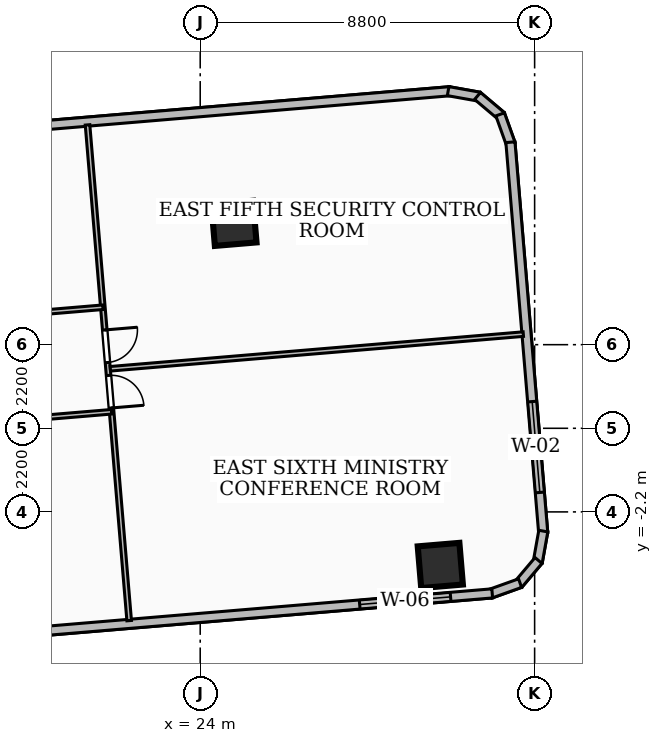
"""IFC4 building model, lengths in metres.
Left out: names, types, materials, properties, quantities, classifications, styles, units other than length and angle.
Written with IfcOpenShell. Run it as: python <this file> out.ifc"""

import sys

from ifc_helpers import new_model, si_unit, direction, frame, frame_2d, origin, origin_2d, place, context, subcontext, project, spatial, rectangle, extrude, element, fill, save


model = new_model("IFC4")
c1 = context("Model", 3, precision=1e-05, world=origin(), true_north=direction((0.0, 1.0)))
c2 = subcontext(c1, "Body", "Model", "MODEL_VIEW")
j1 = project(units=[si_unit("LENGTHUNIT", "METRE"), si_unit("PLANEANGLEUNIT", "RADIAN")], contexts=[c1])
p1 = place(None, origin())
s1 = spatial("IfcSite", under=j1, at=p1, CompositionType="ELEMENT")
p2 = place(p1, origin())
s2 = spatial("IfcBuilding", under=s1, at=p2, CompositionType="ELEMENT")
p3 = place(p2, frame((0.0, 0.0, 64.08)))
s3 = spatial("IfcBuildingStorey", under=s2, at=p3, CompositionType="ELEMENT", Elevation=64.08)
for number, where, z_axis, x_axis in (
    (1, (30.318, -3.609, 0.0), (0.0, 0.0, 1.0), (0.996, 0.084, 0.0)),
    (2, (24.888, 5.393, 0.0), (0.0, 0.0, 1.0), (0.996, 0.084, 0.0)),
):
    element("IfcColumn", number, at=place(p3, frame(where, z_axis=z_axis, x_axis=x_axis)), inside=s3, PredefinedType="COLUMN", context=c2, shape_type="SweptSolid", body=[
        extrude(rectangle(XDim=1.1, YDim=1.1, at=origin_2d()), origin(), (0.0, 0.0, 1.0), 3.6),
    ])
p4 = place(p3, frame((13.758, 7.458, 0.0), z_axis=(0.0, 0.0, 1.0), x_axis=(0.996498704409, 0.083608205999, 0.0)))
e3 = element("IfcWall", 3, at=p4, inside=s3, PredefinedType="SOLIDWALL", context=c2, shape_type="SweptSolid", body=[
    extrude(rectangle(XDim=16.875, YDim=0.24, at=frame_2d((8.438, 0.0))), origin(), (0.0, 0.0, 1.0), 2.072),
])
p5 = place(p3, frame((30.524, 8.871, 0.0), z_axis=(0.0, 0.0, 1.0), x_axis=(0.98444754165, -0.175678791378, 0.0)))
e4 = element("IfcWall", 4, at=p5, inside=s3, PredefinedType="SOLIDWALL", context=c2, shape_type="SweptSolid", body=[
    extrude(rectangle(XDim=0.831, YDim=0.24, at=frame_2d((0.416, 0.0))), origin(), (0.0, 0.0, 1.0), 3.34),
])
p6 = place(p3, frame((31.298, 8.745, 0.0), z_axis=(0.0, 0.0, 1.0), x_axis=(0.764000342655, -0.645215837083, 0.0)))
e5 = element("IfcWall", 5, at=p6, inside=s3, PredefinedType="SOLIDWALL", context=c2, shape_type="SweptSolid", body=[
    extrude(rectangle(XDim=0.814, YDim=0.24, at=frame_2d((0.407, 0.0))), origin(), (0.0, 0.0, 1.0), 3.34),
])
p7 = place(p3, frame((31.893, 8.26, 0.0), z_axis=(0.0, 0.0, 1.0), x_axis=(0.337136933599, -0.941455621898, 0.0)))
e6 = element("IfcWall", 6, at=p7, inside=s3, PredefinedType="SOLIDWALL", context=c2, shape_type="SweptSolid", body=[
    extrude(rectangle(XDim=0.831, YDim=0.24, at=frame_2d((0.415, 0.0))), origin(), (0.0, 0.0, 1.0), 3.34),
])
p8 = place(p3, frame((32.163, 7.527, 0.0), z_axis=(0.0, 0.0, 1.0), x_axis=(0.083619213047, -0.996497780835, 0.0)))
e7 = element("IfcWall", 7, at=p8, inside=s3, PredefinedType="SOLIDWALL", context=c2, shape_type="SweptSolid", body=[
    extrude(rectangle(XDim=10.318, YDim=0.24, at=frame_2d((5.159, 0.0))), origin(), (0.0, 0.0, 1.0), 3.34),
])
p9 = place(p8, frame((6.848, 0.0, 0.85)))
e8 = element("IfcOpeningElement", 8, at=p9, cuts=e7, PredefinedType="OPENING", context=c2, shape_type="SweptSolid", body=[
    extrude(rectangle(XDim=2.4, YDim=2.1, at=frame_2d((1.2, 1.05))), frame((0.0, 0.13, 0.0), z_axis=(0.0, -1.0, 0.0), x_axis=(1.0, 0.0, 0.0)), (0.0, 0.0, 1.0), 0.26),
])
p10 = place(p3, frame((33.028, -2.705, 0.0), z_axis=(0.0, 0.0, 1.0), x_axis=(-0.175729613604, -0.984438470857, 0.0)))
e9 = element("IfcWall", 9, at=p10, inside=s3, PredefinedType="SOLIDWALL", context=c2, shape_type="SweptSolid", body=[
    extrude(rectangle(XDim=0.831, YDim=0.24, at=frame_2d((0.416, 0.0))), origin(), (0.0, 0.0, 1.0), 3.34),
])
p11 = place(p3, frame((32.902, -3.479, 0.0), z_axis=(0.0, 0.0, 1.0), x_axis=(-0.645067994637, -0.764125174494, 0.0)))
e10 = element("IfcWall", 10, at=p11, inside=s3, PredefinedType="SOLIDWALL", context=c2, shape_type="SweptSolid", body=[
    extrude(rectangle(XDim=0.814, YDim=0.24, at=frame_2d((0.407, 0.0))), origin(), (0.0, 0.0, 1.0), 3.34),
])
p12 = place(p3, frame((32.417, -4.074, 0.0), z_axis=(0.0, 0.0, 1.0), x_axis=(-0.941455621898, -0.337136933599, 0.0)))
e11 = element("IfcWall", 11, at=p12, inside=s3, PredefinedType="SOLIDWALL", context=c2, shape_type="SweptSolid", body=[
    extrude(rectangle(XDim=0.831, YDim=0.24, at=frame_2d((0.415, 0.0))), origin(), (0.0, 0.0, 1.0), 3.34),
])
p13 = place(p3, frame((31.684, -4.344, 0.0), z_axis=(0.0, 0.0, 1.0), x_axis=(-0.996492776291, -0.083678831256, 0.0)))
e12 = element("IfcWall", 12, at=p13, inside=s3, PredefinedType="SOLIDWALL", context=c2, shape_type="SweptSolid", body=[
    extrude(rectangle(XDim=16.875, YDim=0.24, at=frame_2d((8.438, 0.0))), origin(), (0.0, 0.0, 1.0), 3.34),
])
p14 = place(p13, frame((1.1, 0.0, 0.85)))
e13 = element("IfcOpeningElement", 13, at=p14, cuts=e12, PredefinedType="OPENING", context=c2, shape_type="SweptSolid", body=[
    extrude(rectangle(XDim=2.4, YDim=1.85, at=frame_2d((1.2, 0.925))), frame((0.0, 0.13, 0.0), z_axis=(0.0, -1.0, 0.0), x_axis=(1.0, 0.0, 0.0)), (0.0, 0.0, 1.0), 0.26),
])
p15 = place(p3, frame((21.439, 3.185, 0.0), z_axis=(0.0, 0.0, 1.0), x_axis=(-0.996495574947, -0.083645496662, 0.0)))
e14 = element("IfcWall", 14, at=p15, inside=s3, PredefinedType="PARTITIONING", context=c2, shape_type="SweptSolid", body=[
    extrude(rectangle(XDim=7.341, YDim=0.12, at=frame_2d((3.67, 0.0))), origin(), (0.0, 0.0, 1.0), 2.152),
])
p16 = place(p15, frame((5.626, 0.0, 0.0)))
e15 = element("IfcOpeningElement", 15, at=p16, cuts=e14, PredefinedType="OPENING", context=c2, shape_type="SweptSolid", body=[
    extrude(rectangle(XDim=0.86, YDim=2.04, at=frame_2d((0.43, 1.02))), frame((0.0, 0.07, 0.0), z_axis=(0.0, -1.0, 0.0), x_axis=(1.0, 0.0, 0.0)), (0.0, 0.0, 1.0), 0.14),
])
p17 = place(p15, frame((1.956, 0.0, 0.0)))
e16 = element("IfcOpeningElement", 16, at=p17, cuts=e14, PredefinedType="OPENING", context=c2, shape_type="SweptSolid", body=[
    extrude(rectangle(XDim=0.86, YDim=2.04, at=frame_2d((0.43, 1.02))), frame((0.0, 0.07, 0.0), z_axis=(0.0, -1.0, 0.0), x_axis=(1.0, 0.0, 0.0)), (0.0, 0.0, 1.0), 0.14),
])
p18 = place(p3, frame((14.355, -0.179, 0.0), z_axis=(0.0, 0.0, 1.0), x_axis=(0.996495574947, 0.083645496662, 0.0)))
e17 = element("IfcWall", 17, at=p18, inside=s3, PredefinedType="PARTITIONING", context=c2, shape_type="SweptSolid", body=[
    extrude(rectangle(XDim=7.341, YDim=0.12, at=frame_2d((3.67, 0.0))), origin(), (0.0, 0.0, 1.0), 2.152),
])
p19 = place(p18, frame((3.19, 0.0, 0.0)))
e18 = element("IfcOpeningElement", 18, at=p19, cuts=e17, PredefinedType="OPENING", context=c2, shape_type="SweptSolid", body=[
    extrude(rectangle(XDim=0.9, YDim=2.06, at=frame_2d((0.45, 1.03))), frame((0.0, 0.07, 0.0), z_axis=(0.0, -1.0, 0.0), x_axis=(1.0, 0.0, 0.0)), (0.0, 0.0, 1.0), 0.14),
])
p20 = place(p3, frame((21.635, 1.566, 0.0), z_axis=(0.0, 0.0, 1.0), x_axis=(0.996496019183, 0.083640204167, 0.0)))
e19 = element("IfcWall", 19, at=p20, inside=s3, PredefinedType="PARTITIONING", context=c2, shape_type="SweptSolid", body=[
    extrude(rectangle(XDim=10.905, YDim=0.12, at=frame_2d((5.453, 0.0))), origin(), (0.0, 0.0, 1.0), 2.152),
])
p21 = place(p3, frame((21.035, 7.983, 0.0), z_axis=(0.0, 0.0, 1.0), x_axis=(0.083743136752, -0.996487374254, 0.0)))
e20 = element("IfcWall", 20, at=p21, inside=s3, PredefinedType="PARTITIONING", context=c2, shape_type="SweptSolid", body=[
    extrude(rectangle(XDim=13.09, YDim=0.12, at=frame_2d((6.545, 0.0))), origin(), (0.0, 0.0, 1.0), 2.152),
])
p22 = place(p21, frame((6.615, 0.0, 0.0)))
e21 = element("IfcOpeningElement", 21, at=p22, cuts=e20, PredefinedType="OPENING", context=c2, shape_type="SweptSolid", body=[
    extrude(rectangle(XDim=0.86, YDim=2.04, at=frame_2d((0.43, 1.02))), frame((0.0, 0.07, 0.0), z_axis=(0.0, -1.0, 0.0), x_axis=(1.0, 0.0, 0.0)), (0.0, 0.0, 1.0), 0.14),
])
p23 = place(p21, frame((5.415, 0.0, 0.0)))
e22 = element("IfcOpeningElement", 22, at=p23, cuts=e20, PredefinedType="OPENING", context=c2, shape_type="SweptSolid", body=[
    extrude(rectangle(XDim=0.86, YDim=2.04, at=frame_2d((0.43, 1.02))), frame((0.0, 0.07, 0.0), z_axis=(0.0, -1.0, 0.0), x_axis=(1.0, 0.0, 0.0)), (0.0, 0.0, 1.0), 0.14),
])
p24 = place(p9, origin())
e23 = element("IfcWindow", 23, at=p24, inside=s3, PartitioningType="SINGLE_PANEL", PredefinedType="WINDOW", context=c2, shape_type="SweptSolid", body=[
    extrude(rectangle(XDim=2.4, YDim=2.1, at=frame_2d((1.2, 1.05))), frame((0.0, 0.03, 0.0), z_axis=(0.0, -1.0, 0.0), x_axis=(1.0, 0.0, 0.0)), (0.0, 0.0, 1.0), 0.06),
])
fill(e8, e23)
p25 = place(p14, origin())
e24 = element("IfcWindow", 24, at=p25, inside=s3, PartitioningType="SINGLE_PANEL", PredefinedType="WINDOW", context=c2, shape_type="SweptSolid", body=[
    extrude(rectangle(XDim=2.4, YDim=1.85, at=frame_2d((1.2, 0.925))), frame((0.0, 0.03, 0.0), z_axis=(0.0, -1.0, 0.0), x_axis=(1.0, 0.0, 0.0)), (0.0, 0.0, 1.0), 0.06),
])
fill(e13, e24)
p26 = place(p22, origin())
e25 = element("IfcDoor", 25, at=p26, inside=s3, OperationType="SINGLE_SWING_RIGHT", PredefinedType="DOOR", context=c2, shape_type="SweptSolid", body=[
    extrude(rectangle(XDim=0.86, YDim=2.04, at=frame_2d((0.43, 1.02))), frame((0.0, 0.025, 0.0), z_axis=(0.0, -1.0, 0.0), x_axis=(1.0, 0.0, 0.0)), (0.0, 0.0, 1.0), 0.05),
])
fill(e21, e25)
p27 = place(p23, origin())
e26 = element("IfcDoor", 26, at=p27, inside=s3, OperationType="SINGLE_SWING_LEFT", PredefinedType="DOOR", context=c2, shape_type="SweptSolid", body=[
    extrude(rectangle(XDim=0.86, YDim=2.04, at=frame_2d((0.43, 1.02))), frame((0.0, 0.025, 0.0), z_axis=(0.0, -1.0, 0.0), x_axis=(1.0, 0.0, 0.0)), (0.0, 0.0, 1.0), 0.05),
])
fill(e22, e26)
save(model, sys.argv[1])
